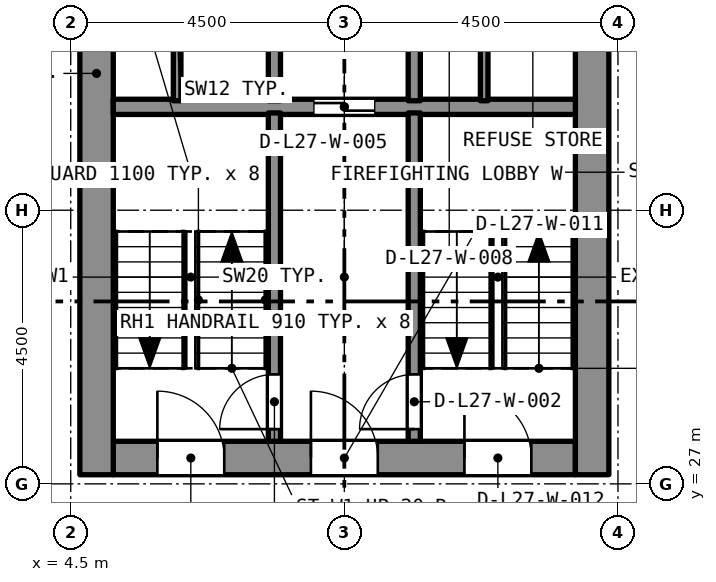
"""IFC4 building model, lengths in metres.
Left out: names, types, materials, properties, quantities, classifications, styles, units other than length and angle.
Written with IfcOpenShell. Run it as: python <this file> out.ifc"""

import sys

from ifc_helpers import new_model, si_unit, direction, frame, frame_2d, origin, place, context, subcontext, project, spatial, rectangle, extrude, element, fill, save


model = new_model("IFC4")
c1 = context("Model", 3, precision=1e-05, world=origin(), true_north=direction((0.0, 1.0)))
c2 = subcontext(c1, "Body", "Model", "MODEL_VIEW")
j1 = project(units=[si_unit("LENGTHUNIT", "METRE"), si_unit("PLANEANGLEUNIT", "RADIAN")], contexts=[c1])
p1 = place(None, origin())
s1 = spatial("IfcSite", under=j1, at=p1, CompositionType="ELEMENT")
p2 = place(p1, origin())
s2 = spatial("IfcBuilding", under=s1, at=p2, CompositionType="ELEMENT")
p3 = place(p2, frame((0.0, 0.0, 99.2)))
s3 = spatial("IfcBuildingStorey", under=s2, at=p3, CompositionType="ELEMENT", Elevation=99.2)
p4 = place(p3, frame((5.2, 27.425, 0.0), z_axis=(0.0, 0.0, 1.0), x_axis=(1.0, 0.0, 0.0)))
e1 = element("IfcWall", 1, at=p4, inside=s3, PredefinedType="SOLIDWALL", context=c2, shape_type="SweptSolid", body=[
    extrude(rectangle(XDim=7.6, YDim=0.55, at=frame_2d((3.8, 0.0))), origin(), (0.0, 0.0, 1.0), 3.2),
])
p5 = place(p4, frame((0.725, 0.0, 0.0)))
e2 = element("IfcOpeningElement", 2, at=p5, cuts=e1, PredefinedType="OPENING", context=c2, shape_type="SweptSolid", body=[
    extrude(rectangle(XDim=1.1, YDim=2.1, at=frame_2d((0.55, 1.05))), frame((0.0, 0.285, 0.0), z_axis=(0.0, -1.0, 0.0), x_axis=(1.0, 0.0, 0.0)), (0.0, 0.0, 1.0), 0.57),
])
p6 = place(p4, frame((3.25, 0.0, 0.0)))
e3 = element("IfcOpeningElement", 3, at=p6, cuts=e1, PredefinedType="OPENING", context=c2, shape_type="SweptSolid", body=[
    extrude(rectangle(XDim=1.1, YDim=2.1, at=frame_2d((0.55, 1.05))), frame((0.0, 0.285, 0.0), z_axis=(0.0, -1.0, 0.0), x_axis=(1.0, 0.0, 0.0)), (0.0, 0.0, 1.0), 0.57),
])
p7 = place(p4, frame((5.775, 0.0, 0.0)))
e4 = element("IfcOpeningElement", 4, at=p7, cuts=e1, PredefinedType="OPENING", context=c2, shape_type="SweptSolid", body=[
    extrude(rectangle(XDim=1.1, YDim=2.1, at=frame_2d((0.55, 1.05))), frame((0.0, 0.285, 0.0), z_axis=(0.0, -1.0, 0.0), x_axis=(1.0, 0.0, 0.0)), (0.0, 0.0, 1.0), 0.57),
])
p8 = place(p3, frame((4.925, 27.15, 0.0), z_axis=(0.0, 0.0, 1.0), x_axis=(0.0, 1.0, 0.0)))
e5 = element("IfcWall", 5, at=p8, inside=s3, PredefinedType="SOLIDWALL", context=c2, shape_type="SweptSolid", body=[
    extrude(rectangle(XDim=13.2, YDim=0.55, at=frame_2d((6.6, 0.0))), origin(), (0.0, 0.0, 1.0), 3.2),
])
p9 = place(p8, frame((8.8, 0.0, 0.0)))
e6 = element("IfcOpeningElement", 6, at=p9, cuts=e5, PredefinedType="OPENING", context=c2, shape_type="SweptSolid", body=[
    extrude(rectangle(XDim=1.2, YDim=2.1, at=frame_2d((0.6, 1.05))), frame((0.0, 0.285, 0.0), z_axis=(0.0, -1.0, 0.0), x_axis=(1.0, 0.0, 0.0)), (0.0, 0.0, 1.0), 0.57),
])
p10 = place(p3, frame((13.075, 27.15, 0.0), z_axis=(0.0, 0.0, 1.0), x_axis=(0.0, 1.0, 0.0)))
e7 = element("IfcWall", 7, at=p10, inside=s3, PredefinedType="SOLIDWALL", context=c2, shape_type="SweptSolid", body=[
    extrude(rectangle(XDim=13.2, YDim=0.55, at=frame_2d((6.6, 0.0))), origin(), (0.0, 0.0, 1.0), 3.2),
])
p11 = place(p10, frame((10.95, 0.0, 0.0)))
e8 = element("IfcOpeningElement", 8, at=p11, cuts=e7, PredefinedType="OPENING", context=c2, shape_type="SweptSolid", body=[
    extrude(rectangle(XDim=1.1, YDim=2.1, at=frame_2d((0.55, 1.05))), frame((0.0, 0.285, 0.0), z_axis=(0.0, -1.0, 0.0), x_axis=(1.0, 0.0, 0.0)), (0.0, 0.0, 1.0), 0.57),
])
p12 = place(p10, frame((8.8, 0.0, 0.0)))
e9 = element("IfcOpeningElement", 9, at=p12, cuts=e7, PredefinedType="OPENING", context=c2, shape_type="SweptSolid", body=[
    extrude(rectangle(XDim=1.2, YDim=2.1, at=frame_2d((0.6, 1.05))), frame((0.0, 0.285, 0.0), z_axis=(0.0, -1.0, 0.0), x_axis=(1.0, 0.0, 0.0)), (0.0, 0.0, 1.0), 0.57),
])
p13 = place(p3, frame((5.2, 33.2, 0.0), z_axis=(0.0, 0.0, 1.0), x_axis=(1.0, 0.0, 0.0)))
e10 = element("IfcWall", 10, at=p13, inside=s3, PredefinedType="SOLIDWALL", context=c2, shape_type="SweptSolid", body=[
    extrude(rectangle(XDim=7.6, YDim=0.25, at=frame_2d((3.8, 0.0))), origin(), (0.0, 0.0, 1.0), 2.9),
])
p14 = place(p13, frame((3.3, 0.0, 0.0)))
e11 = element("IfcOpeningElement", 11, at=p14, cuts=e10, PredefinedType="OPENING", context=c2, shape_type="SweptSolid", body=[
    extrude(rectangle(XDim=1.0, YDim=2.1, at=frame_2d((0.5, 1.05))), frame((0.0, 0.135, 0.0), z_axis=(0.0, -1.0, 0.0), x_axis=(1.0, 0.0, 0.0)), (0.0, 0.0, 1.0), 0.27),
])
p15 = place(p3, frame((7.85, 27.7, 0.0), z_axis=(0.0, 0.0, 1.0), x_axis=(0.0, 1.0, 0.0)))
e12 = element("IfcWall", 12, at=p15, inside=s3, PredefinedType="SOLIDWALL", context=c2, shape_type="SweptSolid", body=[
    extrude(rectangle(XDim=5.4, YDim=0.2, at=frame_2d((2.7, 0.0))), origin(), (0.0, 0.0, 1.0), 2.9),
])
p16 = place(p15, frame((0.2, 0.0, 0.0)))
e13 = element("IfcOpeningElement", 13, at=p16, cuts=e12, PredefinedType="OPENING", context=c2, shape_type="SweptSolid", body=[
    extrude(rectangle(XDim=0.9, YDim=2.1, at=frame_2d((0.45, 1.05))), frame((0.0, 0.11, 0.0), z_axis=(0.0, -1.0, 0.0), x_axis=(1.0, 0.0, 0.0)), (0.0, 0.0, 1.0), 0.22),
])
p17 = place(p3, frame((10.15, 27.7, 0.0), z_axis=(0.0, 0.0, 1.0), x_axis=(0.0, 1.0, 0.0)))
e14 = element("IfcWall", 14, at=p17, inside=s3, PredefinedType="SOLIDWALL", context=c2, shape_type="SweptSolid", body=[
    extrude(rectangle(XDim=5.4, YDim=0.2, at=frame_2d((2.7, 0.0))), origin(), (0.0, 0.0, 1.0), 2.9),
])
p18 = place(p17, frame((0.2, 0.0, 0.0)))
e15 = element("IfcOpeningElement", 15, at=p18, cuts=e14, PredefinedType="OPENING", context=c2, shape_type="SweptSolid", body=[
    extrude(rectangle(XDim=0.9, YDim=2.1, at=frame_2d((0.45, 1.05))), frame((0.0, 0.11, 0.0), z_axis=(0.0, -1.0, 0.0), x_axis=(1.0, 0.0, 0.0)), (0.0, 0.0, 1.0), 0.22),
])
for number, where, z_axis, x_axis in (
    (16, (7.85, 33.3, 0.0), (0.0, 0.0, 1.0), (0.0, 1.0, 0.0)),
    (17, (10.15, 33.3, 0.0), (0.0, 0.0, 1.0), (0.0, 1.0, 0.0)),
):
    element("IfcWall", number, at=place(p3, frame(where, z_axis=z_axis, x_axis=x_axis)), inside=s3, PredefinedType="SOLIDWALL", context=c2, shape_type="SweptSolid", body=[
        extrude(rectangle(XDim=2.3, YDim=0.2, at=frame_2d((1.15, 0.0))), origin(), (0.0, 0.0, 1.0), 2.9),
    ])
for number, where, z_axis, x_axis in (
    (18, (6.25, 33.3, 0.0), (0.0, 0.0, 1.0), (0.0, 1.0, 0.0)),
    (19, (11.3, 33.3, 0.0), (0.0, 0.0, 1.0), (0.0, 1.0, 0.0)),
):
    element("IfcWall", number, at=place(p3, frame(where, z_axis=z_axis, x_axis=x_axis)), inside=s3, PredefinedType="PARTITIONING", context=c2, shape_type="SweptSolid", body=[
        extrude(rectangle(XDim=2.3, YDim=0.125, at=frame_2d((1.15, 0.0))), origin(), (0.0, 0.0, 1.0), 2.9),
    ])
p19 = place(p16, origin())
e20 = element("IfcDoor", 20, at=p19, inside=s3, OperationType="SINGLE_SWING_LEFT", PredefinedType="DOOR", context=c2, shape_type="SweptSolid", body=[
    extrude(rectangle(XDim=0.9, YDim=2.1, at=frame_2d((0.45, 1.05))), frame((0.0, 0.025, 0.0), z_axis=(0.0, -1.0, 0.0), x_axis=(1.0, 0.0, 0.0)), (0.0, 0.0, 1.0), 0.05),
])
fill(e13, e20)
p20 = place(p18, origin())
e21 = element("IfcDoor", 21, at=p20, inside=s3, OperationType="SINGLE_SWING_LEFT", PredefinedType="DOOR", context=c2, shape_type="SweptSolid", body=[
    extrude(rectangle(XDim=0.9, YDim=2.1, at=frame_2d((0.45, 1.05))), frame((0.0, 0.025, 0.0), z_axis=(0.0, -1.0, 0.0), x_axis=(1.0, 0.0, 0.0)), (0.0, 0.0, 1.0), 0.05),
])
fill(e15, e21)
p21 = place(p14, origin())
e22 = element("IfcDoor", 22, at=p21, inside=s3, OperationType="SLIDING_TO_LEFT", PredefinedType="DOOR", context=c2, shape_type="SweptSolid", body=[
    extrude(rectangle(XDim=1.0, YDim=2.1, at=frame_2d((0.5, 1.05))), frame((0.0, 0.025, 0.0), z_axis=(0.0, -1.0, 0.0), x_axis=(1.0, 0.0, 0.0)), (0.0, 0.0, 1.0), 0.05),
])
fill(e11, e22)
p22 = place(p5, origin())
e23 = element("IfcDoor", 23, at=p22, inside=s3, OperationType="SINGLE_SWING_LEFT", PredefinedType="DOOR", context=c2, shape_type="SweptSolid", body=[
    extrude(rectangle(XDim=1.1, YDim=2.1, at=frame_2d((0.55, 1.05))), frame((0.0, 0.025, 0.0), z_axis=(0.0, -1.0, 0.0), x_axis=(1.0, 0.0, 0.0)), (0.0, 0.0, 1.0), 0.05),
])
fill(e2, e23)
p23 = place(p6, origin())
e24 = element("IfcDoor", 24, at=p23, inside=s3, OperationType="SINGLE_SWING_LEFT", PredefinedType="DOOR", context=c2, shape_type="SweptSolid", body=[
    extrude(rectangle(XDim=1.1, YDim=2.1, at=frame_2d((0.55, 1.05))), frame((0.0, 0.025, 0.0), z_axis=(0.0, -1.0, 0.0), x_axis=(1.0, 0.0, 0.0)), (0.0, 0.0, 1.0), 0.05),
])
fill(e3, e24)
p24 = place(p7, origin())
e25 = element("IfcDoor", 25, at=p24, inside=s3, OperationType="SINGLE_SWING_LEFT", PredefinedType="DOOR", context=c2, shape_type="SweptSolid", body=[
    extrude(rectangle(XDim=1.1, YDim=2.1, at=frame_2d((0.55, 1.05))), frame((0.0, 0.025, 0.0), z_axis=(0.0, -1.0, 0.0), x_axis=(1.0, 0.0, 0.0)), (0.0, 0.0, 1.0), 0.05),
])
fill(e4, e25)
save(model, sys.argv[1])
